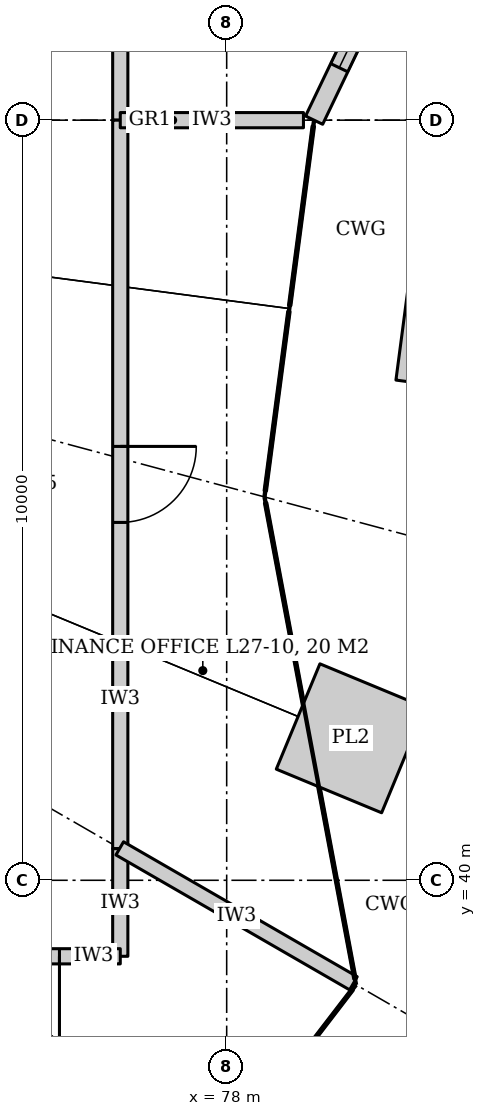
"""IFC4 building model, lengths in metres.
Left out: names, types, materials, properties, quantities, classifications, styles, units other than length and angle.
Written with IfcOpenShell. Run it as: python <this file> out.ifc"""

import sys

from ifc_helpers import new_model, si_unit, direction, frame, frame_2d, origin, place, context, subcontext, project, spatial, rectangle, extrude, element, fill, save


model = new_model("IFC4")
c1 = context("Model", 3, precision=1e-05, world=origin(), true_north=direction((0.0, 1.0)))
c2 = subcontext(c1, "Body", "Model", "MODEL_VIEW")
j1 = project(units=[si_unit("LENGTHUNIT", "METRE"), si_unit("PLANEANGLEUNIT", "RADIAN")], contexts=[c1])
p1 = place(None, origin())
s1 = spatial("IfcSite", under=j1, at=p1, CompositionType="ELEMENT")
p2 = place(p1, origin())
s2 = spatial("IfcBuilding", under=s1, at=p2, CompositionType="ELEMENT")
p3 = place(p2, frame((0.0, 0.0, 122.6)))
s3 = spatial("IfcBuildingStorey", under=s2, at=p3, CompositionType="ELEMENT", Elevation=122.6)
p4 = place(p3, frame((76.6, 59.05, 0.0), z_axis=(0.0, 0.0, 1.0), x_axis=(0.0, -1.0, 0.0)))
e1 = element("IfcWall", 1, at=p4, inside=s3, PredefinedType="PARTITIONING", context=c2, shape_type="SweptSolid", body=[
    extrude(rectangle(XDim=9.05, YDim=0.2, at=frame_2d((4.525, 0.0))), origin(), (0.0, 0.0, 1.0), 3.04),
])
p5 = place(p3, frame((76.6, 50.0, 0.0), z_axis=(0.0, 0.0, 1.0), x_axis=(0.0, -1.0, 0.0)))
e2 = element("IfcWall", 2, at=p5, inside=s3, PredefinedType="PARTITIONING", context=c2, shape_type="SweptSolid", body=[
    extrude(rectangle(XDim=9.584, YDim=0.2, at=frame_2d((4.792, 0.0))), origin(), (0.0, 0.0, 1.0), 3.04),
])
p6 = place(p5, frame((4.292, 0.0, 0.0)))
e3 = element("IfcOpeningElement", 3, at=p6, cuts=e2, PredefinedType="OPENING", context=c2, shape_type="SweptSolid", body=[
    extrude(rectangle(XDim=1.0, YDim=2.1, at=frame_2d((0.5, 1.05))), frame((0.0, 0.11, 0.0), z_axis=(0.0, -1.0, 0.0), x_axis=(1.0, 0.0, 0.0)), (0.0, 0.0, 1.0), 0.22),
])
p7 = place(p3, frame((76.6, 40.416, 0.0), z_axis=(0.0, 0.0, 1.0), x_axis=(0.0, -1.0, 0.0)))
e4 = element("IfcWall", 4, at=p7, inside=s3, PredefinedType="PARTITIONING", context=c2, shape_type="SweptSolid", body=[
    extrude(rectangle(XDim=1.416, YDim=0.2, at=frame_2d((0.708, 0.0))), origin(), (0.0, 0.0, 1.0), 3.04),
])
p8 = place(p3, frame((76.6, 39.0, 0.0), z_axis=(0.0, 0.0, 1.0), x_axis=(-1.0, 0.0, 0.0)))
e5 = element("IfcWall", 5, at=p8, inside=s3, PredefinedType="PARTITIONING", context=c2, shape_type="SweptSolid", body=[
    extrude(rectangle(XDim=3.6, YDim=0.2, at=frame_2d((1.8, 0.0))), origin(), (0.0, 0.0, 1.0), 3.04),
])
p9 = place(p8, frame((0.8, 0.0, 0.0)))
e6 = element("IfcOpeningElement", 6, at=p9, cuts=e5, PredefinedType="OPENING", context=c2, shape_type="SweptSolid", body=[
    extrude(rectangle(XDim=2.0, YDim=2.1, at=frame_2d((1.0, 1.05))), frame((0.0, 0.11, 0.0), z_axis=(0.0, -1.0, 0.0), x_axis=(1.0, 0.0, 0.0)), (0.0, 0.0, 1.0), 0.22),
])
p10 = place(p3, frame((76.6, 50.0, 0.0), z_axis=(0.0, 0.0, 1.0), x_axis=(1.0, 0.0, 0.0)))
e7 = element("IfcWall", 7, at=p10, inside=s3, PredefinedType="PARTITIONING", context=c2, shape_type="SweptSolid", body=[
    extrude(rectangle(XDim=2.41, YDim=0.2, at=frame_2d((1.205, 0.0))), origin(), (0.0, 0.0, 1.0), 3.04),
])
p11 = place(p3, frame((76.593, 40.42, 0.0), z_axis=(0.0, 0.0, 1.0), x_axis=(0.8660424351, -0.499970499736, 0.0)))
e8 = element("IfcWall", 8, at=p11, inside=s3, PredefinedType="PARTITIONING", context=c2, shape_type="SweptSolid", body=[
    extrude(rectangle(XDim=3.55, YDim=0.2, at=frame_2d((1.775, 0.0))), origin(), (0.0, 0.0, 1.0), 3.04),
])
p12 = place(p3, frame((79.15, 50.0, 0.0), z_axis=(0.0, 0.0, 1.0), x_axis=(0.432559700363, 0.901605293697, 0.0)))
e9 = element("IfcWall", 9, at=p12, inside=s3, PredefinedType="SOLIDWALL", context=c2, shape_type="SweptSolid", body=[
    extrude(rectangle(XDim=6.531, YDim=0.25, at=frame_2d((3.265, 0.0))), origin(), (0.0, 0.0, 1.0), 4.04),
])
p13 = place(p12, frame((2.365, 0.0, 0.0)))
e10 = element("IfcOpeningElement", 10, at=p13, cuts=e9, PredefinedType="OPENING", context=c2, shape_type="SweptSolid", body=[
    extrude(rectangle(XDim=1.8, YDim=2.4, at=frame_2d((0.9, 1.2))), frame((0.0, 0.135, 0.0), z_axis=(0.0, -1.0, 0.0), x_axis=(1.0, 0.0, 0.0)), (0.0, 0.0, 1.0), 0.27),
])
p14 = place(p12, frame((0.765, 0.0, 0.0)))
e11 = element("IfcOpeningElement", 11, at=p14, cuts=e9, PredefinedType="OPENING", context=c2, shape_type="SweptSolid", body=[
    extrude(rectangle(XDim=1.2, YDim=2.4, at=frame_2d((0.6, 1.2))), frame((0.0, 0.135, 0.0), z_axis=(0.0, -1.0, 0.0), x_axis=(1.0, 0.0, 0.0)), (0.0, 0.0, 1.0), 0.27),
])
p15 = place(p12, frame((4.565, 0.0, 0.0)))
e12 = element("IfcOpeningElement", 12, at=p15, cuts=e9, PredefinedType="OPENING", context=c2, shape_type="SweptSolid", body=[
    extrude(rectangle(XDim=1.2, YDim=2.4, at=frame_2d((0.6, 1.2))), frame((0.0, 0.135, 0.0), z_axis=(0.0, -1.0, 0.0), x_axis=(1.0, 0.0, 0.0)), (0.0, 0.0, 1.0), 0.27),
])
p16 = place(p9, origin())
e13 = element("IfcDoor", 13, at=p16, inside=s3, OperationType="DOUBLE_DOOR_DOUBLE_SWING", PredefinedType="DOOR", context=c2, shape_type="SweptSolid", body=[
    extrude(rectangle(XDim=2.0, YDim=2.1, at=frame_2d((1.0, 1.05))), frame((0.0, 0.025, 0.0), z_axis=(0.0, -1.0, 0.0), x_axis=(1.0, 0.0, 0.0)), (0.0, 0.0, 1.0), 0.05),
])
fill(e6, e13)
p17 = place(p6, origin())
e14 = element("IfcDoor", 14, at=p17, inside=s3, OperationType="SINGLE_SWING_LEFT", PredefinedType="DOOR", context=c2, shape_type="SweptSolid", body=[
    extrude(rectangle(XDim=1.0, YDim=2.1, at=frame_2d((0.5, 1.05))), frame((0.0, 0.025, 0.0), z_axis=(0.0, -1.0, 0.0), x_axis=(1.0, 0.0, 0.0)), (0.0, 0.0, 1.0), 0.05),
])
fill(e3, e14)
p18 = place(p14, origin())
e15 = element("IfcWindow", 15, at=p18, inside=s3, PartitioningType="SINGLE_PANEL", PredefinedType="WINDOW", context=c2, shape_type="SweptSolid", body=[
    extrude(rectangle(XDim=1.2, YDim=2.4, at=frame_2d((0.6, 1.2))), frame((0.0, 0.03, 0.0), z_axis=(0.0, -1.0, 0.0), x_axis=(1.0, 0.0, 0.0)), (0.0, 0.0, 1.0), 0.06),
])
fill(e11, e15)
save(model, sys.argv[1])
